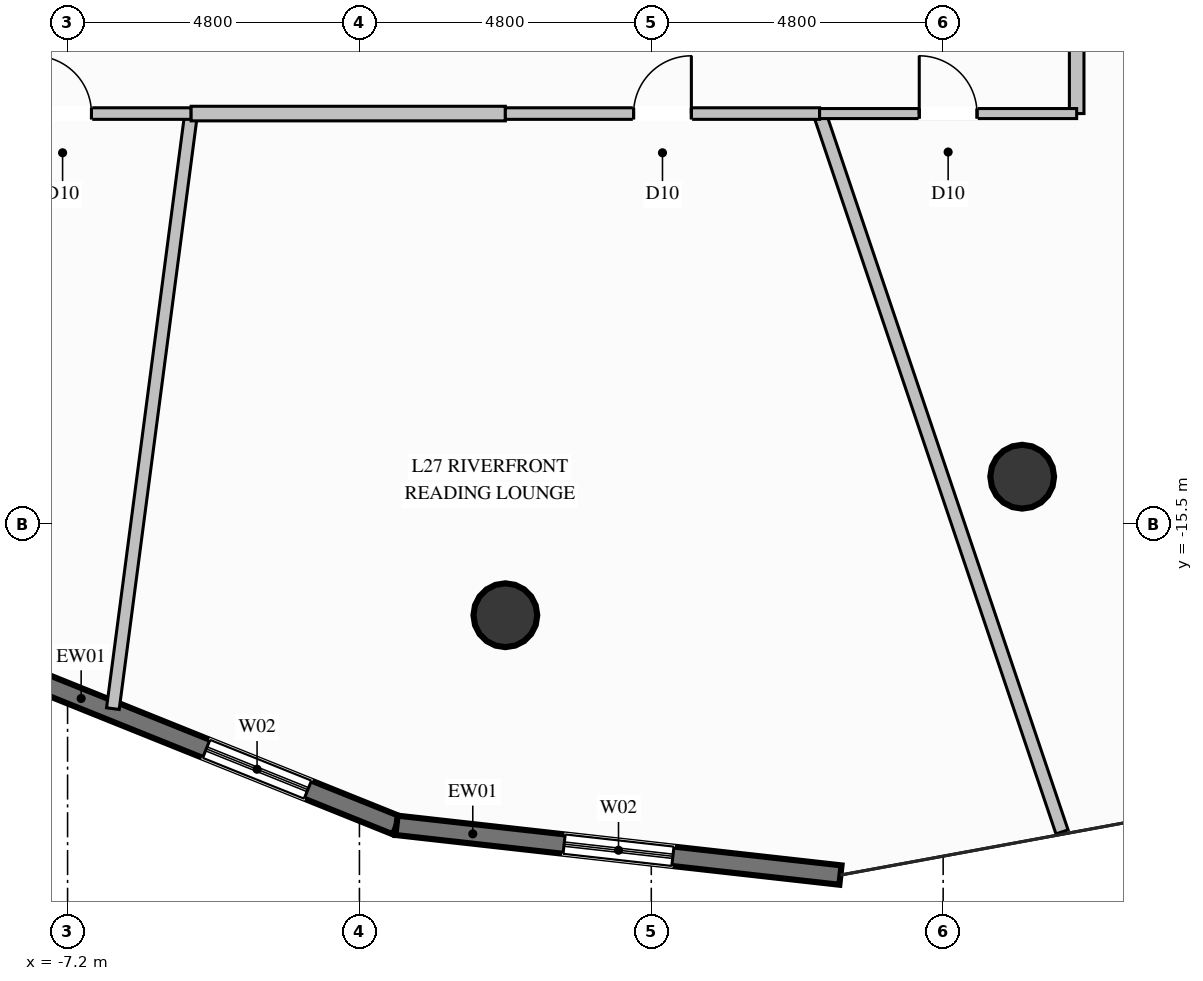
"""IFC4 building model, lengths in metres.
Left out: names, types, materials, properties, quantities, classifications, styles, units other than length and angle.
Written with IfcOpenShell. Run it as: python <this file> out.ifc"""

import sys

from ifc_helpers import new_model, si_unit, direction, frame, frame_2d, origin, origin_2d, place, context, subcontext, project, spatial, rectangle, circle, extrude, element, fill, save


model = new_model("IFC4")
c1 = context("Model", 3, precision=1e-05, world=origin(), true_north=direction((0.0, 1.0)))
c2 = subcontext(c1, "Body", "Model", "MODEL_VIEW")
j1 = project(units=[si_unit("LENGTHUNIT", "METRE"), si_unit("PLANEANGLEUNIT", "RADIAN")], contexts=[c1])
p1 = place(None, origin())
s1 = spatial("IfcSite", under=j1, at=p1, CompositionType="ELEMENT")
p2 = place(p1, origin())
s2 = spatial("IfcBuilding", under=s1, at=p2, CompositionType="ELEMENT")
p3 = place(p2, frame((0.0, 0.0, 109.8)))
s3 = spatial("IfcBuildingStorey", under=s2, at=p3, CompositionType="ELEMENT", Elevation=109.8)
for number, where, z_axis, x_axis in (
    (1, (0.0, -17.0, 0.0), (0.0, 0.0, 1.0), (1.0, 0.0, 0.0)),
    (2, (8.5, -14.722, 0.0), (0.0, 0.0, 1.0), (1.0, 0.0, 0.0)),
):
    element("IfcColumn", number, at=place(p3, frame(where, z_axis=z_axis, x_axis=x_axis)), inside=s3, PredefinedType="COLUMN", context=c2, shape_type="SweptSolid", body=[
        extrude(circle(Radius=0.525, at=origin_2d()), origin(), (0.0, 0.0, 1.0), 3.6),
    ])
p4 = place(p3, frame((-1.79, -20.455, 0.0), z_axis=(0.0, 0.0, 1.0), x_axis=(-0.927795739468, 0.373088549577, 0.0)))
e3 = element("IfcWall", 3, at=p4, inside=s3, PredefinedType="SOLIDWALL", context=c2, shape_type="SweptSolid", body=[
    extrude(rectangle(XDim=7.559, YDim=0.32, at=frame_2d((3.779, 0.0))), origin(), (0.0, 0.0, 1.0), 3.35),
])
p5 = place(p4, frame((1.572, 0.0, 0.35)))
e4 = element("IfcOpeningElement", 4, at=p5, cuts=e3, PredefinedType="OPENING", context=c2, shape_type="SweptSolid", body=[
    extrude(rectangle(XDim=1.8, YDim=2.6, at=frame_2d((0.9, 1.3))), frame((0.0, 0.17, 0.0), z_axis=(0.0, -1.0, 0.0), x_axis=(1.0, 0.0, 0.0)), (0.0, 0.0, 1.0), 0.34),
])
p6 = place(p3, frame((5.511, -21.273, 0.0), z_axis=(0.0, 0.0, 1.0), x_axis=(-0.993784044115, 0.111325081016, 0.0)))
e5 = element("IfcWall", 5, at=p6, inside=s3, PredefinedType="SOLIDWALL", context=c2, shape_type="SweptSolid", body=[
    extrude(rectangle(XDim=7.347, YDim=0.32, at=frame_2d((3.673, 0.0))), origin(), (0.0, 0.0, 1.0), 3.35),
])
p7 = place(p6, frame((2.773, 0.0, 0.35)))
e6 = element("IfcOpeningElement", 6, at=p7, cuts=e5, PredefinedType="OPENING", context=c2, shape_type="SweptSolid", body=[
    extrude(rectangle(XDim=1.8, YDim=2.6, at=frame_2d((0.9, 1.3))), frame((0.0, 0.17, 0.0), z_axis=(0.0, -1.0, 0.0), x_axis=(1.0, 0.0, 0.0)), (0.0, 0.0, 1.0), 0.34),
])
p8 = place(p3, frame((9.396, -5.325, 0.0), z_axis=(0.0, 0.0, 1.0), x_axis=(0.862912125579, -0.505353998232, 0.0)))
e7 = element("IfcWall", 7, at=p8, inside=s3, PredefinedType="PARTITIONING", context=c2, shape_type="SweptSolid", body=[
    extrude(rectangle(XDim=5.658, YDim=0.21, at=frame_2d((2.829, 0.0))), origin(), (0.0, 0.0, 1.0), 2.791),
])
p9 = place(p3, frame((-5.168, -8.75, 0.0), z_axis=(0.0, 0.0, 1.0), x_axis=(-0.130403964366, -0.991460945311, 0.0)))
e8 = element("IfcWall", 8, at=p9, inside=s3, PredefinedType="PARTITIONING", context=c2, shape_type="SweptSolid", body=[
    extrude(rectangle(XDim=9.87, YDim=0.21, at=frame_2d((4.935, 0.0))), origin(), (0.0, 0.0, 1.0), 3.35),
])
p10 = place(p3, frame((-9.396, -8.75, 0.0), z_axis=(0.0, 0.0, 1.0), x_axis=(1.0, 0.0, 0.0)))
e9 = element("IfcWall", 9, at=p10, inside=s3, PredefinedType="PARTITIONING", context=c2, shape_type="SweptSolid", body=[
    extrude(rectangle(XDim=4.228, YDim=0.19, at=frame_2d((2.114, 0.0))), origin(), (0.0, 0.0, 1.0), 3.35),
])
p11 = place(p10, frame((1.639, 0.0, 0.0)))
e10 = element("IfcOpeningElement", 10, at=p11, cuts=e9, PredefinedType="OPENING", context=c2, shape_type="SweptSolid", body=[
    extrude(rectangle(XDim=0.95, YDim=2.1, at=frame_2d((0.475, 1.05))), frame((0.0, 0.105, 0.0), z_axis=(0.0, -1.0, 0.0), x_axis=(1.0, 0.0, 0.0)), (0.0, 0.0, 1.0), 0.21),
])
p12 = place(p3, frame((5.168, -8.75, 0.0), z_axis=(0.0, 0.0, 1.0), x_axis=(0.319791389232, -0.947487977429, 0.0)))
e11 = element("IfcWall", 11, at=p12, inside=s3, PredefinedType="PARTITIONING", context=c2, shape_type="SweptSolid", body=[
    extrude(rectangle(XDim=12.468, YDim=0.21, at=frame_2d((6.234, 0.0))), origin(), (0.0, 0.0, 1.0), 3.35),
])
p13 = place(p3, frame((-5.168, -8.75, 0.0), z_axis=(0.0, 0.0, 1.0), x_axis=(1.0, 0.0, 0.0)))
e12 = element("IfcWall", 12, at=p13, inside=s3, PredefinedType="PARTITIONING", context=c2, shape_type="SweptSolid", body=[
    extrude(rectangle(XDim=5.168, YDim=0.24, at=frame_2d((2.584, 0.0))), origin(), (0.0, 0.0, 1.0), 3.35),
])
p14 = place(p3, frame((0.0, -8.75, 0.0), z_axis=(0.0, 0.0, 1.0), x_axis=(1.0, 0.0, 0.0)))
e13 = element("IfcWall", 13, at=p14, inside=s3, PredefinedType="PARTITIONING", context=c2, shape_type="SweptSolid", body=[
    extrude(rectangle(XDim=5.168, YDim=0.19, at=frame_2d((2.584, 0.0))), origin(), (0.0, 0.0, 1.0), 3.35),
])
p15 = place(p14, frame((2.109, 0.0, 0.0)))
e14 = element("IfcOpeningElement", 14, at=p15, cuts=e13, PredefinedType="OPENING", context=c2, shape_type="SweptSolid", body=[
    extrude(rectangle(XDim=0.95, YDim=2.1, at=frame_2d((0.475, 1.05))), frame((0.0, 0.105, 0.0), z_axis=(0.0, -1.0, 0.0), x_axis=(1.0, 0.0, 0.0)), (0.0, 0.0, 1.0), 0.21),
])
p16 = place(p3, frame((9.396, -8.75, 0.0), z_axis=(0.0, 0.0, 1.0), x_axis=(0.0, 1.0, 0.0)))
e15 = element("IfcWall", 15, at=p16, inside=s3, PredefinedType="PARTITIONING", context=c2, shape_type="SweptSolid", body=[
    extrude(rectangle(XDim=3.425, YDim=0.24, at=frame_2d((1.712, 0.0))), origin(), (0.0, 0.0, 1.0), 3.35),
])
p17 = place(p3, frame((5.168, -8.75, 0.0), z_axis=(0.0, 0.0, 1.0), x_axis=(1.0, 0.0, 0.0)))
e16 = element("IfcWall", 16, at=p17, inside=s3, PredefinedType="PARTITIONING", context=c2, shape_type="SweptSolid", body=[
    extrude(rectangle(XDim=4.228, YDim=0.165, at=frame_2d((2.114, 0.0))), origin(), (0.0, 0.0, 1.0), 3.35),
])
p18 = place(p17, frame((1.639, 0.0, 0.0)))
e17 = element("IfcOpeningElement", 17, at=p18, cuts=e16, PredefinedType="OPENING", context=c2, shape_type="SweptSolid", body=[
    extrude(rectangle(XDim=0.95, YDim=2.1, at=frame_2d((0.475, 1.05))), frame((0.0, 0.093, 0.0), z_axis=(0.0, -1.0, 0.0), x_axis=(1.0, 0.0, 0.0)), (0.0, 0.0, 1.0), 0.185),
])
p19 = place(p5, origin())
e18 = element("IfcWindow", 18, at=p19, inside=s3, PartitioningType="SINGLE_PANEL", PredefinedType="WINDOW", context=c2, shape_type="SweptSolid", body=[
    extrude(rectangle(XDim=1.8, YDim=2.6, at=frame_2d((0.9, 1.3))), frame((0.0, 0.03, 0.0), z_axis=(0.0, -1.0, 0.0), x_axis=(1.0, 0.0, 0.0)), (0.0, 0.0, 1.0), 0.06),
])
fill(e4, e18)
p20 = place(p7, origin())
e19 = element("IfcWindow", 19, at=p20, inside=s3, PartitioningType="SINGLE_PANEL", PredefinedType="WINDOW", context=c2, shape_type="SweptSolid", body=[
    extrude(rectangle(XDim=1.8, YDim=2.6, at=frame_2d((0.9, 1.3))), frame((0.0, 0.03, 0.0), z_axis=(0.0, -1.0, 0.0), x_axis=(1.0, 0.0, 0.0)), (0.0, 0.0, 1.0), 0.06),
])
fill(e6, e19)
p21 = place(p11, origin())
e20 = element("IfcDoor", 20, at=p21, inside=s3, OperationType="SINGLE_SWING_LEFT", PredefinedType="DOOR", context=c2, shape_type="SweptSolid", body=[
    extrude(rectangle(XDim=0.95, YDim=2.1, at=frame_2d((0.475, 1.05))), frame((0.0, 0.025, 0.0), z_axis=(0.0, -1.0, 0.0), x_axis=(1.0, 0.0, 0.0)), (0.0, 0.0, 1.0), 0.05),
])
fill(e10, e20)
p22 = place(p15, origin())
e21 = element("IfcDoor", 21, at=p22, inside=s3, OperationType="SINGLE_SWING_RIGHT", PredefinedType="DOOR", context=c2, shape_type="SweptSolid", body=[
    extrude(rectangle(XDim=0.95, YDim=2.1, at=frame_2d((0.475, 1.05))), frame((0.0, 0.025, 0.0), z_axis=(0.0, -1.0, 0.0), x_axis=(1.0, 0.0, 0.0)), (0.0, 0.0, 1.0), 0.05),
])
fill(e14, e21)
p23 = place(p18, origin())
e22 = element("IfcDoor", 22, at=p23, inside=s3, OperationType="SINGLE_SWING_LEFT", PredefinedType="DOOR", context=c2, shape_type="SweptSolid", body=[
    extrude(rectangle(XDim=0.95, YDim=2.1, at=frame_2d((0.475, 1.05))), frame((0.0, 0.025, 0.0), z_axis=(0.0, -1.0, 0.0), x_axis=(1.0, 0.0, 0.0)), (0.0, 0.0, 1.0), 0.05),
])
fill(e17, e22)
save(model, sys.argv[1])
